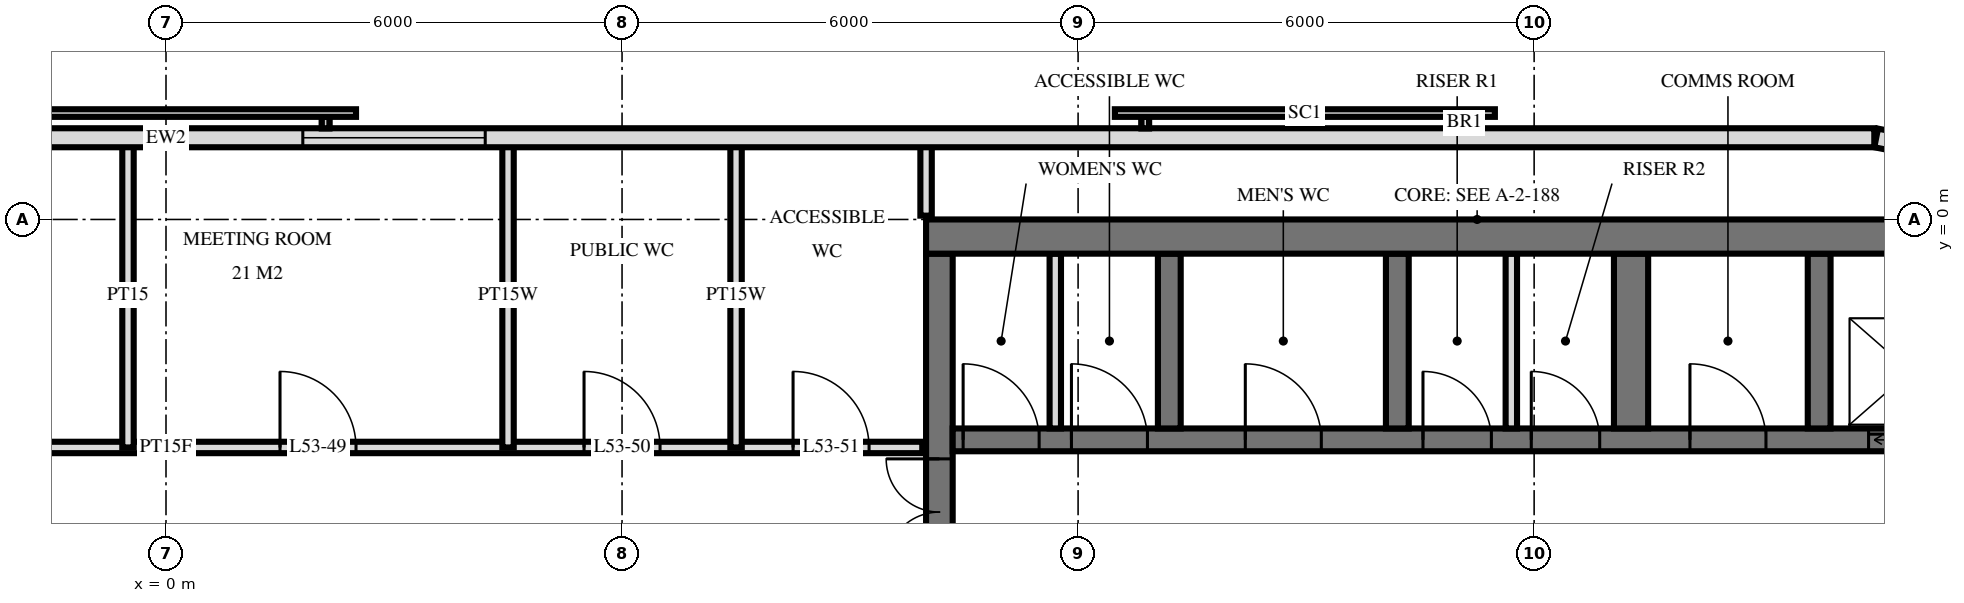
"""IFC4 building model, lengths in metres.
Left out: names, types, materials, properties, quantities, classifications, styles, units other than length and angle.
Written with IfcOpenShell. Run it as: python <this file> out.ifc"""

import sys

from ifc_helpers import new_model, si_unit, direction, frame, frame_2d, origin, place, context, subcontext, project, spatial, rectangle, extrude, element, fill, save


model = new_model("IFC4")
c1 = context("Model", 3, precision=1e-05, world=origin(), true_north=direction((0.0, 1.0)))
c2 = subcontext(c1, "Body", "Model", "MODEL_VIEW")
j1 = project(units=[si_unit("LENGTHUNIT", "METRE"), si_unit("PLANEANGLEUNIT", "RADIAN")], contexts=[c1])
p1 = place(None, origin())
s1 = spatial("IfcSite", under=j1, at=p1, CompositionType="ELEMENT")
p2 = place(p1, origin())
s2 = spatial("IfcBuilding", under=s1, at=p2, CompositionType="ELEMENT")
p3 = place(p2, frame((0.0, 0.0, 204.6)))
s3 = spatial("IfcBuildingStorey", under=s2, at=p3, CompositionType="ELEMENT", Elevation=204.6)
p4 = place(p3, frame((10.0, -0.225, 0.0), z_axis=(0.0, 0.0, 1.0), x_axis=(1.0, 0.0, 0.0)))
e1 = element("IfcWall", 1, at=p4, inside=s3, PredefinedType="SHEAR", context=c2, shape_type="SweptSolid", body=[
    extrude(rectangle(XDim=14.5, YDim=0.45, at=frame_2d((7.25, 0.0))), origin(), (0.0, 0.0, 1.0), 3.5),
])
p5 = place(p3, frame((10.175, -14.55, 0.0), z_axis=(0.0, 0.0, 1.0), x_axis=(0.0, 1.0, 0.0)))
e2 = element("IfcWall", 2, at=p5, inside=s3, PredefinedType="SHEAR", context=c2, shape_type="SweptSolid", body=[
    extrude(rectangle(XDim=14.1, YDim=0.35, at=frame_2d((7.05, 0.0))), origin(), (0.0, 0.0, 1.0), 3.5),
])
p6 = place(p5, frame((8.4, 0.0, 0.0)))
e3 = element("IfcOpeningElement", 3, at=p6, cuts=e2, PredefinedType="OPENING", context=c2, shape_type="SweptSolid", body=[
    extrude(rectangle(XDim=1.4, YDim=2.4, at=frame_2d((0.7, 1.2))), frame((0.0, 0.185, 0.0), z_axis=(0.0, -1.0, 0.0), x_axis=(1.0, 0.0, 0.0)), (0.0, 0.0, 1.0), 0.37),
])
p7 = place(p5, frame((10.0, 0.0, 0.0)))
e4 = element("IfcOpeningElement", 4, at=p7, cuts=e2, PredefinedType="OPENING", context=c2, shape_type="SweptSolid", body=[
    extrude(rectangle(XDim=1.4, YDim=2.4, at=frame_2d((0.7, 1.2))), frame((0.0, 0.185, 0.0), z_axis=(0.0, -1.0, 0.0), x_axis=(1.0, 0.0, 0.0)), (0.0, 0.0, 1.0), 0.37),
])
p8 = place(p5, frame((4.0, 0.0, 0.0)))
e5 = element("IfcOpeningElement", 5, at=p8, cuts=e2, PredefinedType="OPENING", context=c2, shape_type="SweptSolid", body=[
    extrude(rectangle(XDim=1.2, YDim=2.1, at=frame_2d((0.6, 1.05))), frame((0.0, 0.185, 0.0), z_axis=(0.0, -1.0, 0.0), x_axis=(1.0, 0.0, 0.0)), (0.0, 0.0, 1.0), 0.37),
])
p9 = place(p3, frame((10.35, -2.9, 0.0), z_axis=(0.0, 0.0, 1.0), x_axis=(1.0, 0.0, 0.0)))
e6 = element("IfcWall", 6, at=p9, inside=s3, PredefinedType="SHEAR", context=c2, shape_type="SweptSolid", body=[
    extrude(rectangle(XDim=13.7, YDim=0.3, at=frame_2d((6.85, 0.0))), origin(), (0.0, 0.0, 1.0), 3.5),
])
p10 = place(p9, frame((12.05, 0.0, 0.0)))
e7 = element("IfcOpeningElement", 7, at=p10, cuts=e6, PredefinedType="OPENING", context=c2, shape_type="SweptSolid", body=[
    extrude(rectangle(XDim=1.1, YDim=2.1, at=frame_2d((0.55, 1.05))), frame((0.0, 0.16, 0.0), z_axis=(0.0, -1.0, 0.0), x_axis=(1.0, 0.0, 0.0)), (0.0, 0.0, 1.0), 0.32),
])
p11 = place(p9, frame((6.188, 0.0, 0.0)))
e8 = element("IfcOpeningElement", 8, at=p11, cuts=e6, PredefinedType="OPENING", context=c2, shape_type="SweptSolid", body=[
    extrude(rectangle(XDim=0.9, YDim=2.1, at=frame_2d((0.45, 1.05))), frame((0.0, 0.16, 0.0), z_axis=(0.0, -1.0, 0.0), x_axis=(1.0, 0.0, 0.0)), (0.0, 0.0, 1.0), 0.32),
])
p12 = place(p9, frame((7.613, 0.0, 0.0)))
e9 = element("IfcOpeningElement", 9, at=p12, cuts=e6, PredefinedType="OPENING", context=c2, shape_type="SweptSolid", body=[
    extrude(rectangle(XDim=0.9, YDim=2.1, at=frame_2d((0.45, 1.05))), frame((0.0, 0.16, 0.0), z_axis=(0.0, -1.0, 0.0), x_axis=(1.0, 0.0, 0.0)), (0.0, 0.0, 1.0), 0.32),
])
p13 = place(p9, frame((0.137, 0.0, 0.0)))
e10 = element("IfcOpeningElement", 10, at=p13, cuts=e6, PredefinedType="OPENING", context=c2, shape_type="SweptSolid", body=[
    extrude(rectangle(XDim=1.0, YDim=2.1, at=frame_2d((0.5, 1.05))), frame((0.0, 0.16, 0.0), z_axis=(0.0, -1.0, 0.0), x_axis=(1.0, 0.0, 0.0)), (0.0, 0.0, 1.0), 0.32),
])
p14 = place(p9, frame((1.562, 0.0, 0.0)))
e11 = element("IfcOpeningElement", 11, at=p14, cuts=e6, PredefinedType="OPENING", context=c2, shape_type="SweptSolid", body=[
    extrude(rectangle(XDim=1.0, YDim=2.1, at=frame_2d((0.5, 1.05))), frame((0.0, 0.16, 0.0), z_axis=(0.0, -1.0, 0.0), x_axis=(1.0, 0.0, 0.0)), (0.0, 0.0, 1.0), 0.32),
])
p15 = place(p9, frame((3.85, 0.0, 0.0)))
e12 = element("IfcOpeningElement", 12, at=p15, cuts=e6, PredefinedType="OPENING", context=c2, shape_type="SweptSolid", body=[
    extrude(rectangle(XDim=1.0, YDim=2.1, at=frame_2d((0.5, 1.05))), frame((0.0, 0.16, 0.0), z_axis=(0.0, -1.0, 0.0), x_axis=(1.0, 0.0, 0.0)), (0.0, 0.0, 1.0), 0.32),
])
p16 = place(p9, frame((9.7, 0.0, 0.0)))
e13 = element("IfcOpeningElement", 13, at=p16, cuts=e6, PredefinedType="OPENING", context=c2, shape_type="SweptSolid", body=[
    extrude(rectangle(XDim=1.0, YDim=2.1, at=frame_2d((0.5, 1.05))), frame((0.0, 0.16, 0.0), z_axis=(0.0, -1.0, 0.0), x_axis=(1.0, 0.0, 0.0)), (0.0, 0.0, 1.0), 0.32),
])
for number, where, z_axis, x_axis in (
    (14, (13.2, -2.75, 0.0), (0.0, 0.0, 1.0), (0.0, 1.0, 0.0)),
    (15, (16.2, -2.75, 0.0), (0.0, 0.0, 1.0), (0.0, 1.0, 0.0)),
):
    element("IfcWall", number, at=place(p3, frame(where, z_axis=z_axis, x_axis=x_axis)), inside=s3, PredefinedType="SHEAR", context=c2, shape_type="SweptSolid", body=[
        extrude(rectangle(XDim=2.3, YDim=0.3, at=frame_2d((1.15, 0.0))), origin(), (0.0, 0.0, 1.0), 3.5),
    ])
p17 = place(p3, frame((19.275, -2.75, 0.0), z_axis=(0.0, 0.0, 1.0), x_axis=(0.0, 1.0, 0.0)))
e16 = element("IfcWall", 16, at=p17, inside=s3, PredefinedType="SHEAR", context=c2, shape_type="SweptSolid", body=[
    extrude(rectangle(XDim=2.3, YDim=0.45, at=frame_2d((1.15, 0.0))), origin(), (0.0, 0.0, 1.0), 3.5),
])
p18 = place(p3, frame((21.75, -2.75, 0.0), z_axis=(0.0, 0.0, 1.0), x_axis=(0.0, 1.0, 0.0)))
e17 = element("IfcWall", 17, at=p18, inside=s3, PredefinedType="SHEAR", context=c2, shape_type="SweptSolid", body=[
    extrude(rectangle(XDim=2.3, YDim=0.3, at=frame_2d((1.15, 0.0))), origin(), (0.0, 0.0, 1.0), 3.5),
])
p19 = place(p3, frame((24.149, 0.745, 0.0), z_axis=(0.0, 0.0, 1.0), x_axis=(-0.980803419081, 0.194999110559, 0.0)))
e18 = element("IfcWall", 18, at=p19, inside=s3, PredefinedType="SOLIDWALL", context=c2, shape_type="SweptSolid", body=[
    extrude(rectangle(XDim=1.681, YDim=0.25, at=frame_2d((0.841, 0.0))), origin(), (0.0, 0.0, 1.0), 3.22),
])
p20 = place(p3, frame((22.475, 1.075, 0.0), z_axis=(0.0, 0.0, 1.0), x_axis=(-1.0, 0.0, 0.0)))
e19 = element("IfcWall", 19, at=p20, inside=s3, PredefinedType="SOLIDWALL", context=c2, shape_type="SweptSolid", body=[
    extrude(rectangle(XDim=44.951, YDim=0.25, at=frame_2d((22.475, 0.0))), origin(), (0.0, 0.0, 1.0), 3.22),
])
p21 = place(p20, frame((18.275, 0.0, 0.9)))
e20 = element("IfcOpeningElement", 20, at=p21, cuts=e19, PredefinedType="OPENING", context=c2, shape_type="SweptSolid", body=[
    extrude(rectangle(XDim=2.4, YDim=1.5, at=frame_2d((1.2, 0.75))), frame((0.0, 0.135, 0.0), z_axis=(0.0, -1.0, 0.0), x_axis=(1.0, 0.0, 0.0)), (0.0, 0.0, 1.0), 0.27),
])
p22 = place(p20, frame((24.275, 0.0, 0.9)))
e21 = element("IfcOpeningElement", 21, at=p22, cuts=e19, PredefinedType="OPENING", context=c2, shape_type="SweptSolid", body=[
    extrude(rectangle(XDim=2.4, YDim=1.5, at=frame_2d((1.2, 0.75))), frame((0.0, 0.135, 0.0), z_axis=(0.0, -1.0, 0.0), x_axis=(1.0, 0.0, 0.0)), (0.0, 0.0, 1.0), 0.27),
])
p23 = place(p20, frame((27.275, 0.0, 0.9)))
e22 = element("IfcOpeningElement", 22, at=p23, cuts=e19, PredefinedType="OPENING", context=c2, shape_type="SweptSolid", body=[
    extrude(rectangle(XDim=2.4, YDim=1.5, at=frame_2d((1.2, 0.75))), frame((0.0, 0.135, 0.0), z_axis=(0.0, -1.0, 0.0), x_axis=(1.0, 0.0, 0.0)), (0.0, 0.0, 1.0), 0.27),
])
for number, where, z_axis, x_axis in (
    (23, (17.7, -2.75, 0.0), (0.0, 0.0, 1.0), (0.0, 1.0, 0.0)),
    (24, (11.7, -2.75, 0.0), (0.0, 0.0, 1.0), (0.0, 1.0, 0.0)),
):
    element("IfcWall", number, at=place(p3, frame(where, z_axis=z_axis, x_axis=x_axis)), inside=s3, PredefinedType="PARTITIONING", context=c2, shape_type="SweptSolid", body=[
        extrude(rectangle(XDim=2.3, YDim=0.15, at=frame_2d((1.15, 0.0))), origin(), (0.0, 0.0, 1.0), 3.2),
    ])
p24 = place(p3, frame((10.0, 0.05, 0.0), z_axis=(0.0, 0.0, 1.0), x_axis=(0.0, 1.0, 0.0)))
e25 = element("IfcWall", 25, at=p24, inside=s3, PredefinedType="PLUMBINGWALL", context=c2, shape_type="SweptSolid", body=[
    extrude(rectangle(XDim=0.97, YDim=0.15, at=frame_2d((0.485, 0.0))), origin(), (0.0, 0.0, 1.0), 3.22),
])
for number, where, z_axis, x_axis in (
    (26, (7.5, -3.0, 0.0), (0.0, 0.0, 1.0), (0.0, 1.0, 0.0)),
    (27, (4.5, -3.0, 0.0), (0.0, 0.0, 1.0), (0.0, 1.0, 0.0)),
):
    element("IfcWall", number, at=place(p3, frame(where, z_axis=z_axis, x_axis=x_axis)), inside=s3, PredefinedType="PLUMBINGWALL", context=c2, shape_type="SweptSolid", body=[
        extrude(rectangle(XDim=4.02, YDim=0.15, at=frame_2d((2.01, 0.0))), origin(), (0.0, 0.0, 1.0), 3.22),
    ])
p25 = place(p3, frame((-0.5, -3.0, 0.0), z_axis=(0.0, 0.0, 1.0), x_axis=(0.0, 1.0, 0.0)))
e28 = element("IfcWall", 28, at=p25, inside=s3, PredefinedType="PARTITIONING", context=c2, shape_type="SweptSolid", body=[
    extrude(rectangle(XDim=4.02, YDim=0.15, at=frame_2d((2.01, 0.0))), origin(), (0.0, 0.0, 1.0), 3.22),
])
p26 = place(p3, frame((-9.95, -3.0, 0.0), z_axis=(0.0, 0.0, 1.0), x_axis=(1.0, 0.0, 0.0)))
e29 = element("IfcWall", 29, at=p26, inside=s3, PredefinedType="PARTITIONING", context=c2, shape_type="SweptSolid", body=[
    extrude(rectangle(XDim=19.9, YDim=0.15, at=frame_2d((9.95, 0.0))), origin(), (0.0, 0.0, 1.0), 3.22),
])
p27 = place(p26, frame((4.2, 0.0, 0.0)))
e30 = element("IfcOpeningElement", 30, at=p27, cuts=e29, PredefinedType="OPENING", context=c2, shape_type="SweptSolid", body=[
    extrude(rectangle(XDim=1.0, YDim=2.1, at=frame_2d((0.5, 1.05))), frame((0.0, 0.085, 0.0), z_axis=(0.0, -1.0, 0.0), x_axis=(1.0, 0.0, 0.0)), (0.0, 0.0, 1.0), 0.17),
])
p28 = place(p26, frame((11.45, 0.0, 0.0)))
e31 = element("IfcOpeningElement", 31, at=p28, cuts=e29, PredefinedType="OPENING", context=c2, shape_type="SweptSolid", body=[
    extrude(rectangle(XDim=1.0, YDim=2.1, at=frame_2d((0.5, 1.05))), frame((0.0, 0.085, 0.0), z_axis=(0.0, -1.0, 0.0), x_axis=(1.0, 0.0, 0.0)), (0.0, 0.0, 1.0), 0.17),
])
p29 = place(p26, frame((15.45, 0.0, 0.0)))
e32 = element("IfcOpeningElement", 32, at=p29, cuts=e29, PredefinedType="OPENING", context=c2, shape_type="SweptSolid", body=[
    extrude(rectangle(XDim=1.0, YDim=2.1, at=frame_2d((0.5, 1.05))), frame((0.0, 0.085, 0.0), z_axis=(0.0, -1.0, 0.0), x_axis=(1.0, 0.0, 0.0)), (0.0, 0.0, 1.0), 0.17),
])
p30 = place(p26, frame((18.2, 0.0, 0.0)))
e33 = element("IfcOpeningElement", 33, at=p30, cuts=e29, PredefinedType="OPENING", context=c2, shape_type="SweptSolid", body=[
    extrude(rectangle(XDim=1.0, YDim=2.1, at=frame_2d((0.5, 1.05))), frame((0.0, 0.085, 0.0), z_axis=(0.0, -1.0, 0.0), x_axis=(1.0, 0.0, 0.0)), (0.0, 0.0, 1.0), 0.17),
])
p31 = place(p21, origin())
e34 = element("IfcWindow", 34, at=p31, inside=s3, PartitioningType="SINGLE_PANEL", PredefinedType="WINDOW", context=c2, shape_type="SweptSolid", body=[
    extrude(rectangle(XDim=2.4, YDim=1.5, at=frame_2d((1.2, 0.75))), frame((0.0, 0.03, 0.0), z_axis=(0.0, -1.0, 0.0), x_axis=(1.0, 0.0, 0.0)), (0.0, 0.0, 1.0), 0.06),
])
fill(e20, e34)
p32 = place(p10, origin())
e35 = element("IfcDoor", 35, at=p32, inside=s3, OperationType="DOUBLE_DOOR_SLIDING", PredefinedType="USERDEFINED", context=c2, shape_type="SweptSolid", body=[
    extrude(rectangle(XDim=1.1, YDim=2.1, at=frame_2d((0.55, 1.05))), frame((0.0, 0.025, 0.0), z_axis=(0.0, -1.0, 0.0), x_axis=(1.0, 0.0, 0.0)), (0.0, 0.0, 1.0), 0.05),
])
fill(e7, e35)
p33 = place(p7, origin())
e36 = element("IfcDoor", 36, at=p33, inside=s3, OperationType="DOUBLE_DOOR_SINGLE_SWING", PredefinedType="DOOR", context=c2, shape_type="SweptSolid", body=[
    extrude(rectangle(XDim=1.4, YDim=2.4, at=frame_2d((0.7, 1.2))), frame((0.0, 0.025, 0.0), z_axis=(0.0, -1.0, 0.0), x_axis=(1.0, 0.0, 0.0)), (0.0, 0.0, 1.0), 0.05),
])
fill(e4, e36)
p34 = place(p11, origin())
e37 = element("IfcDoor", 37, at=p34, inside=s3, OperationType="SINGLE_SWING_RIGHT", PredefinedType="DOOR", context=c2, shape_type="SweptSolid", body=[
    extrude(rectangle(XDim=0.9, YDim=2.1, at=frame_2d((0.45, 1.05))), frame((0.0, 0.025, 0.0), z_axis=(0.0, -1.0, 0.0), x_axis=(1.0, 0.0, 0.0)), (0.0, 0.0, 1.0), 0.05),
])
fill(e8, e37)
p35 = place(p12, origin())
e38 = element("IfcDoor", 38, at=p35, inside=s3, OperationType="SINGLE_SWING_RIGHT", PredefinedType="DOOR", context=c2, shape_type="SweptSolid", body=[
    extrude(rectangle(XDim=0.9, YDim=2.1, at=frame_2d((0.45, 1.05))), frame((0.0, 0.025, 0.0), z_axis=(0.0, -1.0, 0.0), x_axis=(1.0, 0.0, 0.0)), (0.0, 0.0, 1.0), 0.05),
])
fill(e9, e38)
p36 = place(p13, origin())
e39 = element("IfcDoor", 39, at=p36, inside=s3, OperationType="SINGLE_SWING_RIGHT", PredefinedType="DOOR", context=c2, shape_type="SweptSolid", body=[
    extrude(rectangle(XDim=1.0, YDim=2.1, at=frame_2d((0.5, 1.05))), frame((0.0, 0.025, 0.0), z_axis=(0.0, -1.0, 0.0), x_axis=(1.0, 0.0, 0.0)), (0.0, 0.0, 1.0), 0.05),
])
fill(e10, e39)
p37 = place(p14, origin())
e40 = element("IfcDoor", 40, at=p37, inside=s3, OperationType="SINGLE_SWING_RIGHT", PredefinedType="DOOR", context=c2, shape_type="SweptSolid", body=[
    extrude(rectangle(XDim=1.0, YDim=2.1, at=frame_2d((0.5, 1.05))), frame((0.0, 0.025, 0.0), z_axis=(0.0, -1.0, 0.0), x_axis=(1.0, 0.0, 0.0)), (0.0, 0.0, 1.0), 0.05),
])
fill(e11, e40)
p38 = place(p15, origin())
e41 = element("IfcDoor", 41, at=p38, inside=s3, OperationType="SINGLE_SWING_RIGHT", PredefinedType="DOOR", context=c2, shape_type="SweptSolid", body=[
    extrude(rectangle(XDim=1.0, YDim=2.1, at=frame_2d((0.5, 1.05))), frame((0.0, 0.025, 0.0), z_axis=(0.0, -1.0, 0.0), x_axis=(1.0, 0.0, 0.0)), (0.0, 0.0, 1.0), 0.05),
])
fill(e12, e41)
p39 = place(p16, origin())
e42 = element("IfcDoor", 42, at=p39, inside=s3, OperationType="SINGLE_SWING_RIGHT", PredefinedType="DOOR", context=c2, shape_type="SweptSolid", body=[
    extrude(rectangle(XDim=1.0, YDim=2.1, at=frame_2d((0.5, 1.05))), frame((0.0, 0.025, 0.0), z_axis=(0.0, -1.0, 0.0), x_axis=(1.0, 0.0, 0.0)), (0.0, 0.0, 1.0), 0.05),
])
fill(e13, e42)
p40 = place(p28, origin())
e43 = element("IfcDoor", 43, at=p40, inside=s3, OperationType="SINGLE_SWING_RIGHT", PredefinedType="DOOR", context=c2, shape_type="SweptSolid", body=[
    extrude(rectangle(XDim=1.0, YDim=2.1, at=frame_2d((0.5, 1.05))), frame((0.0, 0.025, 0.0), z_axis=(0.0, -1.0, 0.0), x_axis=(1.0, 0.0, 0.0)), (0.0, 0.0, 1.0), 0.05),
])
fill(e31, e43)
p41 = place(p29, origin())
e44 = element("IfcDoor", 44, at=p41, inside=s3, OperationType="SINGLE_SWING_RIGHT", PredefinedType="DOOR", context=c2, shape_type="SweptSolid", body=[
    extrude(rectangle(XDim=1.0, YDim=2.1, at=frame_2d((0.5, 1.05))), frame((0.0, 0.025, 0.0), z_axis=(0.0, -1.0, 0.0), x_axis=(1.0, 0.0, 0.0)), (0.0, 0.0, 1.0), 0.05),
])
fill(e32, e44)
p42 = place(p30, origin())
e45 = element("IfcDoor", 45, at=p42, inside=s3, OperationType="SINGLE_SWING_RIGHT", PredefinedType="DOOR", context=c2, shape_type="SweptSolid", body=[
    extrude(rectangle(XDim=1.0, YDim=2.1, at=frame_2d((0.5, 1.05))), frame((0.0, 0.025, 0.0), z_axis=(0.0, -1.0, 0.0), x_axis=(1.0, 0.0, 0.0)), (0.0, 0.0, 1.0), 0.05),
])
fill(e33, e45)
save(model, sys.argv[1])
